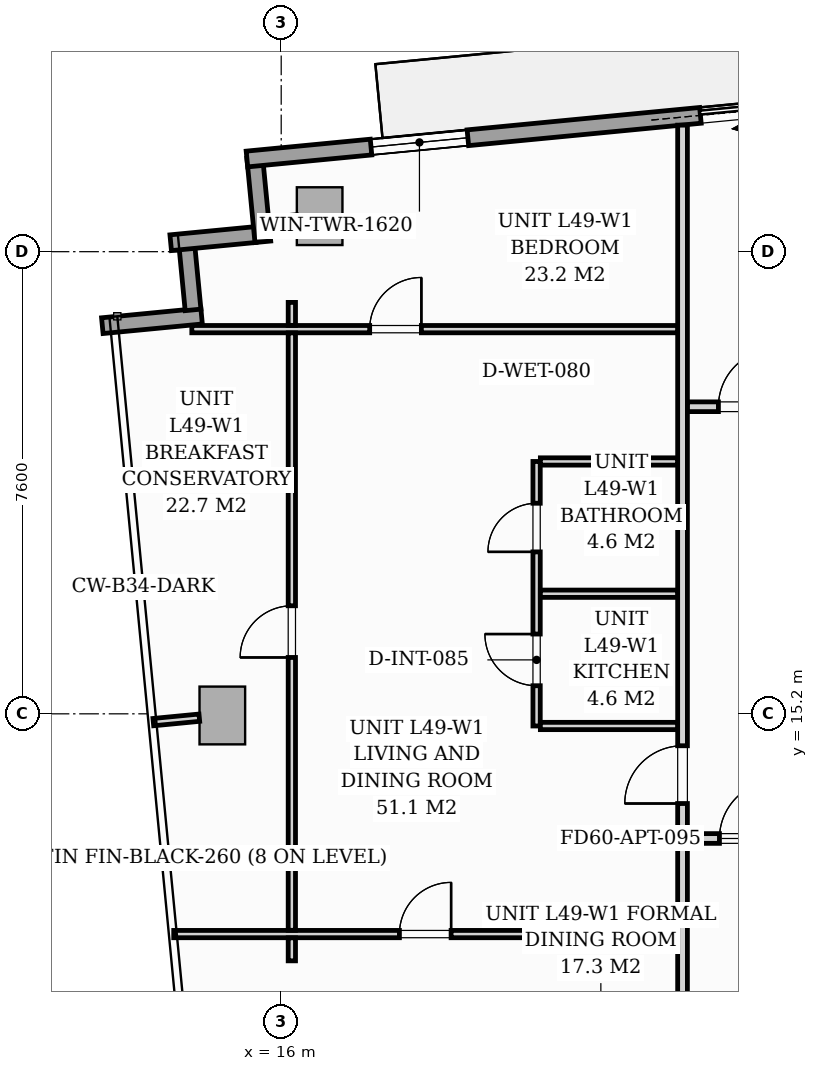
"""IFC4 building model, lengths in metres.
Left out: names, types, materials, properties, quantities, classifications, styles, units other than length and angle.
Written with IfcOpenShell. Run it as: python <this file> out.ifc"""

import sys

from ifc_helpers import new_model, si_unit, direction, frame, frame_2d, origin, origin_2d, place, context, subcontext, project, spatial, rectangle, extrude, source, transform, mapped, element, fill, save


model = new_model("IFC4")
c1 = context("Model", 3, precision=1e-05, world=origin(), true_north=direction((0.0, 1.0)))
c2 = subcontext(c1, "Body", "Model", "MODEL_VIEW")
j1 = project(units=[si_unit("LENGTHUNIT", "METRE"), si_unit("PLANEANGLEUNIT", "RADIAN")], contexts=[c1])
p1 = place(None, origin())
s1 = spatial("IfcSite", under=j1, at=p1, CompositionType="ELEMENT")
p2 = place(p1, origin())
s2 = spatial("IfcBuilding", under=s1, at=p2, CompositionType="ELEMENT")
p3 = place(p2, frame((0.0, 0.0, 173.0)))
s3 = spatial("IfcBuildingStorey", under=s2, at=p3, CompositionType="ELEMENT", Elevation=173.0)
m1 = source(origin(), c2, "Body", "SweptSolid", [
    extrude(rectangle(XDim=0.75, YDim=0.95, at=origin_2d()), origin(), (0.0, 0.0, 1.0), 3.196),
])
for number, where, z_axis, x_axis in (
    (1, (16.632, 23.384, 0.002), (0.0, 0.0, 1.0), (0.995, 0.096, 0.0)),
    (2, (15.032, 15.173, 0.002), (0.0, 0.0, 1.0), (0.995, 0.096, 0.0)),
):
    element("IfcColumn", number, at=place(p3, frame(where, z_axis=z_axis, x_axis=x_axis)), inside=s3, PredefinedType="COLUMN", context=c2, shape_type="MappedRepresentation", body=[
        mapped(m1, transform((0.0, 0.0, 0.0), scale=1.0)),
    ])
p4 = place(p3, frame((13.058, 21.583, 0.0), z_axis=(0.0, 0.0, 1.0), x_axis=(0.995394563142, 0.095862733462, 0.0)))
e3 = element("IfcWall", 3, at=p4, inside=s3, PredefinedType="STANDARD", context=c2, shape_type="SweptSolid", body=[
    extrude(rectangle(XDim=1.64, YDim=0.26, at=frame_2d((0.82, 0.0))), origin(), (0.0, 0.0, 1.0), 2.94),
])
p5 = place(p3, frame((14.55, 21.843, 0.0), z_axis=(0.0, 0.0, 1.0), x_axis=(-0.09576095695, 0.995404359607, 0.0)))
e4 = element("IfcWall", 4, at=p5, inside=s3, PredefinedType="STANDARD", context=c2, shape_type="SweptSolid", body=[
    extrude(rectangle(XDim=1.15, YDim=0.26, at=frame_2d((0.575, 0.0))), origin(), (0.0, 0.0, 1.0), 2.94),
])
p6 = place(p3, frame((14.183, 22.947, 0.0), z_axis=(0.0, 0.0, 1.0), x_axis=(0.99540614245, 0.095742423056, 0.0)))
e5 = element("IfcWall", 5, at=p6, inside=s3, PredefinedType="STANDARD", context=c2, shape_type="SweptSolid", body=[
    extrude(rectangle(XDim=1.395, YDim=0.26, at=frame_2d((0.697, 0.0))), origin(), (0.0, 0.0, 1.0), 2.94),
])
p7 = place(p3, frame((15.698, 22.963, 0.0), z_axis=(0.0, 0.0, 1.0), x_axis=(-0.09589913835, 0.995391056452, 0.0)))
e6 = element("IfcWall", 6, at=p7, inside=s3, PredefinedType="STANDARD", context=c2, shape_type="SweptSolid", body=[
    extrude(rectangle(XDim=1.395, YDim=0.26, at=frame_2d((0.698, 0.0))), origin(), (0.0, 0.0, 1.0), 2.94),
])
p8 = place(p3, frame((15.437, 24.324, 0.0), z_axis=(0.0, 0.0, 1.0), x_axis=(0.995395627913, 0.095851676732, 0.0)))
e7 = element("IfcWall", 7, at=p8, inside=s3, PredefinedType="STANDARD", context=c2, shape_type="SweptSolid", body=[
    extrude(rectangle(XDim=16.1, YDim=0.26, at=frame_2d((8.05, 0.0))), origin(), (0.0, 0.0, 1.0), 2.94),
])
p9 = place(p8, frame((7.492, 0.0, 0.0)))
e8 = element("IfcOpeningElement", 8, at=p9, cuts=e7, PredefinedType="OPENING", context=c2, shape_type="SweptSolid", body=[
    extrude(rectangle(XDim=1.8, YDim=2.06, at=frame_2d((0.9, 1.03))), frame((0.0, 0.14, 0.0), z_axis=(0.0, -1.0, 0.0), x_axis=(1.0, 0.0, 0.0)), (0.0, 0.0, 1.0), 0.28),
])
p10 = place(p8, frame((2.05, 0.0, 0.65)))
e9 = element("IfcOpeningElement", 9, at=p10, cuts=e7, PredefinedType="OPENING", context=c2, shape_type="SweptSolid", body=[
    extrude(rectangle(XDim=1.6, YDim=1.5, at=frame_2d((0.8, 0.75))), frame((0.0, 0.14, 0.0), z_axis=(0.0, -1.0, 0.0), x_axis=(1.0, 0.0, 0.0)), (0.0, 0.0, 1.0), 0.28),
])
p11 = place(p3, frame((22.6, 13.15, 0.0), z_axis=(0.0, 0.0, 1.0), x_axis=(1.0, 0.0, 0.0)))
e10 = element("IfcWall", 10, at=p11, inside=s3, PredefinedType="PARTITIONING", context=c2, shape_type="SweptSolid", body=[
    extrude(rectangle(XDim=23.28, YDim=0.16, at=frame_2d((11.64, 0.0))), origin(), (0.0, 0.0, 1.0), 2.94),
])
p12 = place(p11, frame((0.607, 0.0, 0.0)))
e11 = element("IfcOpeningElement", 11, at=p12, cuts=e10, PredefinedType="OPENING", context=c2, shape_type="SweptSolid", body=[
    extrude(rectangle(XDim=0.95, YDim=2.06, at=frame_2d((0.475, 1.03))), frame((0.0, 0.09, 0.0), z_axis=(0.0, -1.0, 0.0), x_axis=(1.0, 0.0, 0.0)), (0.0, 0.0, 1.0), 0.18),
])
p13 = place(p11, frame((11.717, 0.0, 0.0)))
e12 = element("IfcOpeningElement", 12, at=p13, cuts=e10, PredefinedType="OPENING", context=c2, shape_type="SweptSolid", body=[
    extrude(rectangle(XDim=0.95, YDim=2.06, at=frame_2d((0.475, 1.03))), frame((0.0, 0.09, 0.0), z_axis=(0.0, -1.0, 0.0), x_axis=(1.0, 0.0, 0.0)), (0.0, 0.0, 1.0), 0.18),
])
p14 = place(p3, frame((22.6, 6.922, 0.0), z_axis=(0.0, 0.0, 1.0), x_axis=(0.0, 1.0, 0.0)))
e13 = element("IfcWall", 13, at=p14, inside=s3, PredefinedType="PARTITIONING", context=c2, shape_type="SweptSolid", body=[
    extrude(rectangle(XDim=6.146, YDim=0.16, at=frame_2d((3.073, 0.0))), origin(), (0.0, 0.0, 1.0), 2.94),
])
p15 = place(p3, frame((22.6, 13.232, 0.0), z_axis=(0.0, 0.0, 1.0), x_axis=(0.0, 1.0, 0.0)))
e14 = element("IfcWall", 14, at=p15, inside=s3, PredefinedType="PARTITIONING", context=c2, shape_type="SweptSolid", body=[
    extrude(rectangle(XDim=11.649, YDim=0.16, at=frame_2d((5.824, 0.0))), origin(), (0.0, 0.0, 1.0), 2.94),
])
p16 = place(p15, frame((0.493, 0.0, 0.0)))
e15 = element("IfcOpeningElement", 15, at=p16, cuts=e14, PredefinedType="OPENING", context=c2, shape_type="SweptSolid", body=[
    extrude(rectangle(XDim=0.95, YDim=2.06, at=frame_2d((0.475, 1.03))), frame((0.0, 0.09, 0.0), z_axis=(0.0, -1.0, 0.0), x_axis=(1.0, 0.0, 0.0)), (0.0, 0.0, 1.0), 0.18),
])
p17 = place(p3, frame((20.2, 15.0, 0.0), z_axis=(0.0, 0.0, 1.0), x_axis=(0.0, 1.0, 0.0)))
e16 = element("IfcWall", 16, at=p17, inside=s3, PredefinedType="PARTITIONING", context=c2, shape_type="SweptSolid", body=[
    extrude(rectangle(XDim=4.35, YDim=0.12, at=frame_2d((2.175, 0.0))), origin(), (0.0, 0.0, 1.0), 2.94),
])
p18 = place(p17, frame((0.662, 0.0, 0.0)))
e17 = element("IfcOpeningElement", 17, at=p18, cuts=e16, PredefinedType="OPENING", context=c2, shape_type="SweptSolid", body=[
    extrude(rectangle(XDim=0.85, YDim=2.05, at=frame_2d((0.425, 1.025))), frame((0.0, 0.07, 0.0), z_axis=(0.0, -1.0, 0.0), x_axis=(1.0, 0.0, 0.0)), (0.0, 0.0, 1.0), 0.14),
])
p19 = place(p17, frame((2.863, 0.0, 0.0)))
e18 = element("IfcOpeningElement", 18, at=p19, cuts=e16, PredefinedType="OPENING", context=c2, shape_type="SweptSolid", body=[
    extrude(rectangle(XDim=0.8, YDim=2.02, at=frame_2d((0.4, 1.01))), frame((0.0, 0.07, 0.0), z_axis=(0.0, -1.0, 0.0), x_axis=(1.0, 0.0, 0.0)), (0.0, 0.0, 1.0), 0.14),
])
for number, where, z_axis, x_axis in (
    (19, (20.262, 17.175, 0.0), (0.0, 0.0, 1.0), (1.0, 0.0, 0.0)),
    (20, (20.262, 15.0, 0.0), (0.0, 0.0, 1.0), (1.0, 0.0, 0.0)),
    (21, (20.262, 19.35, 0.0), (0.0, 0.0, 1.0), (1.0, 0.0, 0.0)),
):
    element("IfcWall", number, at=place(p3, frame(where, z_axis=z_axis, x_axis=x_axis)), inside=s3, PredefinedType="PARTITIONING", context=c2, shape_type="SweptSolid", body=[
        extrude(rectangle(XDim=2.256, YDim=0.12, at=frame_2d((1.128, 0.0))), origin(), (0.0, 0.0, 1.0), 2.94),
    ])
p20 = place(p3, frame((14.53, 21.526, 0.0), z_axis=(0.0, 0.0, 1.0), x_axis=(1.0, 0.0, 0.0)))
e22 = element("IfcWall", 22, at=p20, inside=s3, PredefinedType="PARTITIONING", context=c2, shape_type="SweptSolid", body=[
    extrude(rectangle(XDim=7.988, YDim=0.12, at=frame_2d((3.994, 0.0))), origin(), (0.0, 0.0, 1.0), 2.94),
])
p21 = place(p20, frame((2.925, 0.0, 0.0)))
e23 = element("IfcOpeningElement", 23, at=p21, cuts=e22, PredefinedType="OPENING", context=c2, shape_type="SweptSolid", body=[
    extrude(rectangle(XDim=0.85, YDim=2.05, at=frame_2d((0.425, 1.025))), frame((0.0, 0.07, 0.0), z_axis=(0.0, -1.0, 0.0), x_axis=(1.0, 0.0, 0.0)), (0.0, 0.0, 1.0), 0.14),
])
p22 = place(p3, frame((14.233, 11.578, 0.0), z_axis=(0.0, 0.0, 1.0), x_axis=(1.0, 0.0, 0.0)))
e24 = element("IfcWall", 24, at=p22, inside=s3, PredefinedType="PARTITIONING", context=c2, shape_type="SweptSolid", body=[
    extrude(rectangle(XDim=8.285, YDim=0.12, at=frame_2d((4.143, 0.0))), origin(), (0.0, 0.0, 1.0), 2.94),
])
p23 = place(p22, frame((3.711, 0.0, 0.0)))
e25 = element("IfcOpeningElement", 25, at=p23, cuts=e24, PredefinedType="OPENING", context=c2, shape_type="SweptSolid", body=[
    extrude(rectangle(XDim=0.85, YDim=2.05, at=frame_2d((0.425, 1.025))), frame((0.0, 0.07, 0.0), z_axis=(0.0, -1.0, 0.0), x_axis=(1.0, 0.0, 0.0)), (0.0, 0.0, 1.0), 0.14),
])
p24 = place(p3, frame((16.175, 11.138, 0.0), z_axis=(0.0, 0.0, 1.0), x_axis=(0.0, 1.0, 0.0)))
e26 = element("IfcWall", 26, at=p24, inside=s3, PredefinedType="PARTITIONING", context=c2, shape_type="SweptSolid", body=[
    extrude(rectangle(XDim=0.378, YDim=0.12, at=frame_2d((0.189, 0.0))), origin(), (0.0, 0.0, 1.0), 2.94),
])
p25 = place(p3, frame((16.175, 11.64, 0.0), z_axis=(0.0, 0.0, 1.0), x_axis=(0.0, 1.0, 0.0)))
e27 = element("IfcWall", 27, at=p25, inside=s3, PredefinedType="PARTITIONING", context=c2, shape_type="SweptSolid", body=[
    extrude(rectangle(XDim=9.824, YDim=0.12, at=frame_2d((4.912, 0.0))), origin(), (0.0, 0.0, 1.0), 2.383),
])
p26 = place(p25, frame((4.487, 0.0, 0.0)))
e28 = element("IfcOpeningElement", 28, at=p26, cuts=e27, PredefinedType="OPENING", context=c2, shape_type="SweptSolid", body=[
    extrude(rectangle(XDim=0.85, YDim=2.05, at=frame_2d((0.425, 1.025))), frame((0.0, 0.07, 0.0), z_axis=(0.0, -1.0, 0.0), x_axis=(1.0, 0.0, 0.0)), (0.0, 0.0, 1.0), 0.14),
])
p27 = place(p3, frame((16.175, 21.588, 0.0), z_axis=(0.0, 0.0, 1.0), x_axis=(0.0, 1.0, 0.0)))
e29 = element("IfcWall", 29, at=p27, inside=s3, PredefinedType="PARTITIONING", context=c2, shape_type="SweptSolid", body=[
    extrude(rectangle(XDim=0.378, YDim=0.12, at=frame_2d((0.189, 0.0))), origin(), (0.0, 0.0, 1.0), 2.94),
])
p28 = place(p3, frame((22.682, 20.25, 0.0), z_axis=(0.0, 0.0, 1.0), x_axis=(1.0, 0.0, 0.0)))
e30 = element("IfcWall", 30, at=p28, inside=s3, PredefinedType="PARTITIONING", context=c2, shape_type="SweptSolid", body=[
    extrude(rectangle(XDim=1.886, YDim=0.16, at=frame_2d((0.943, 0.0))), origin(), (0.0, 0.0, 1.0), 2.94),
])
p29 = place(p28, frame((0.508, 0.0, 0.0)))
e31 = element("IfcOpeningElement", 31, at=p29, cuts=e30, PredefinedType="OPENING", context=c2, shape_type="SweptSolid", body=[
    extrude(rectangle(XDim=0.95, YDim=2.06, at=frame_2d((0.475, 1.03))), frame((0.0, 0.09, 0.0), z_axis=(0.0, -1.0, 0.0), x_axis=(1.0, 0.0, 0.0)), (0.0, 0.0, 1.0), 0.18),
])
p30 = place(p3, frame((16.254, 23.348, 0.0), z_axis=(0.0, 0.0, 1.0), x_axis=(-0.995384576284, -0.09596637586, 0.0)))
e32 = element("IfcWall", 32, at=p30, inside=s3, PredefinedType="PARTITIONING", context=c2, shape_type="SweptSolid", body=[
    extrude(rectangle(XDim=0.458, YDim=0.12, at=frame_2d((0.229, 0.0))), origin(), (0.0, 0.0, 1.0), 2.94),
])
p31 = place(p3, frame((14.654, 15.136, 0.0), z_axis=(0.0, 0.0, 1.0), x_axis=(-0.995408440582, -0.095718527039, 0.0)))
e33 = element("IfcWall", 33, at=p31, inside=s3, PredefinedType="PARTITIONING", context=c2, shape_type="SweptSolid", body=[
    extrude(rectangle(XDim=0.76, YDim=0.12, at=frame_2d((0.38, 0.0))), origin(), (0.0, 0.0, 1.0), 2.94),
])
m2 = source(origin(), c2, "Body", "SweptSolid", [
    extrude(rectangle(XDim=1.8, YDim=2.06, at=frame_2d((0.9, 1.03))), frame((0.0, 0.025, 0.0), z_axis=(0.0, -1.0, 0.0), x_axis=(1.0, 0.0, 0.0)), (0.0, 0.0, 1.0), 0.05),
])
p32 = place(p9, origin())
e34 = element("IfcDoor", 34, at=p32, inside=s3, OperationType="SLIDING_TO_LEFT", PredefinedType="DOOR", context=c2, shape_type="MappedRepresentation", body=[
    mapped(m2, transform((0.0, 0.0, 0.0), scale=1.0)),
])
fill(e8, e34)
m3 = source(origin(), c2, "Body", "SweptSolid", [
    extrude(rectangle(XDim=1.6, YDim=1.5, at=frame_2d((0.8, 0.75))), frame((0.0, 0.03, 0.0), z_axis=(0.0, -1.0, 0.0), x_axis=(1.0, 0.0, 0.0)), (0.0, 0.0, 1.0), 0.06),
])
p33 = place(p10, origin())
e35 = element("IfcWindow", 35, at=p33, inside=s3, PartitioningType="SINGLE_PANEL", PredefinedType="WINDOW", context=c2, shape_type="MappedRepresentation", body=[
    mapped(m3, transform((0.0, 0.0, 0.0), scale=1.0)),
])
fill(e9, e35)
m4 = source(origin(), c2, "Body", "SweptSolid", [
    extrude(rectangle(XDim=0.95, YDim=2.06, at=frame_2d((0.475, 1.03))), frame((0.0, 0.025, 0.0), z_axis=(0.0, -1.0, 0.0), x_axis=(1.0, 0.0, 0.0)), (0.0, 0.0, 1.0), 0.05),
])
p34 = place(p12, origin())
e36 = element("IfcDoor", 36, at=p34, inside=s3, OperationType="SINGLE_SWING_RIGHT", PredefinedType="DOOR", context=c2, shape_type="MappedRepresentation", body=[
    mapped(m4, transform((0.0, 0.0, 0.0), scale=1.0)),
])
fill(e11, e36)
p35 = place(p16, origin())
e37 = element("IfcDoor", 37, at=p35, inside=s3, OperationType="SINGLE_SWING_LEFT", PredefinedType="DOOR", context=c2, shape_type="MappedRepresentation", body=[
    mapped(m4, transform((0.0, 0.0, 0.0), scale=1.0)),
])
fill(e15, e37)
m5 = source(origin(), c2, "Body", "SweptSolid", [
    extrude(rectangle(XDim=0.85, YDim=2.05, at=frame_2d((0.425, 1.025))), frame((0.0, 0.025, 0.0), z_axis=(0.0, -1.0, 0.0), x_axis=(1.0, 0.0, 0.0)), (0.0, 0.0, 1.0), 0.05),
])
p36 = place(p18, origin())
e38 = element("IfcDoor", 38, at=p36, inside=s3, OperationType="SINGLE_SWING_RIGHT", PredefinedType="DOOR", context=c2, shape_type="MappedRepresentation", body=[
    mapped(m5, transform((0.0, 0.0, 0.0), scale=1.0)),
])
fill(e17, e38)
m6 = source(origin(), c2, "Body", "SweptSolid", [
    extrude(rectangle(XDim=0.8, YDim=2.02, at=frame_2d((0.4, 1.01))), frame((0.0, 0.025, 0.0), z_axis=(0.0, -1.0, 0.0), x_axis=(1.0, 0.0, 0.0)), (0.0, 0.0, 1.0), 0.05),
])
p37 = place(p19, origin())
e39 = element("IfcDoor", 39, at=p37, inside=s3, OperationType="SINGLE_SWING_LEFT", PredefinedType="DOOR", context=c2, shape_type="MappedRepresentation", body=[
    mapped(m6, transform((0.0, 0.0, 0.0), scale=1.0)),
])
fill(e18, e39)
p38 = place(p21, origin())
e40 = element("IfcDoor", 40, at=p38, inside=s3, OperationType="SINGLE_SWING_RIGHT", PredefinedType="DOOR", context=c2, shape_type="MappedRepresentation", body=[
    mapped(m5, transform((0.0, 0.0, 0.0), scale=1.0)),
])
fill(e23, e40)
p39 = place(p23, origin())
e41 = element("IfcDoor", 41, at=p39, inside=s3, OperationType="SINGLE_SWING_RIGHT", PredefinedType="DOOR", context=c2, shape_type="MappedRepresentation", body=[
    mapped(m5, transform((0.0, 0.0, 0.0), scale=1.0)),
])
fill(e25, e41)
p40 = place(p26, origin())
e42 = element("IfcDoor", 42, at=p40, inside=s3, OperationType="SINGLE_SWING_LEFT", PredefinedType="DOOR", context=c2, shape_type="MappedRepresentation", body=[
    mapped(m5, transform((0.0, 0.0, 0.0), scale=1.0)),
])
fill(e28, e42)
p41 = place(p29, origin())
e43 = element("IfcDoor", 43, at=p41, inside=s3, OperationType="SINGLE_SWING_RIGHT", PredefinedType="DOOR", context=c2, shape_type="MappedRepresentation", body=[
    mapped(m4, transform((0.0, 0.0, 0.0), scale=1.0)),
])
fill(e31, e43)
save(model, sys.argv[1])
